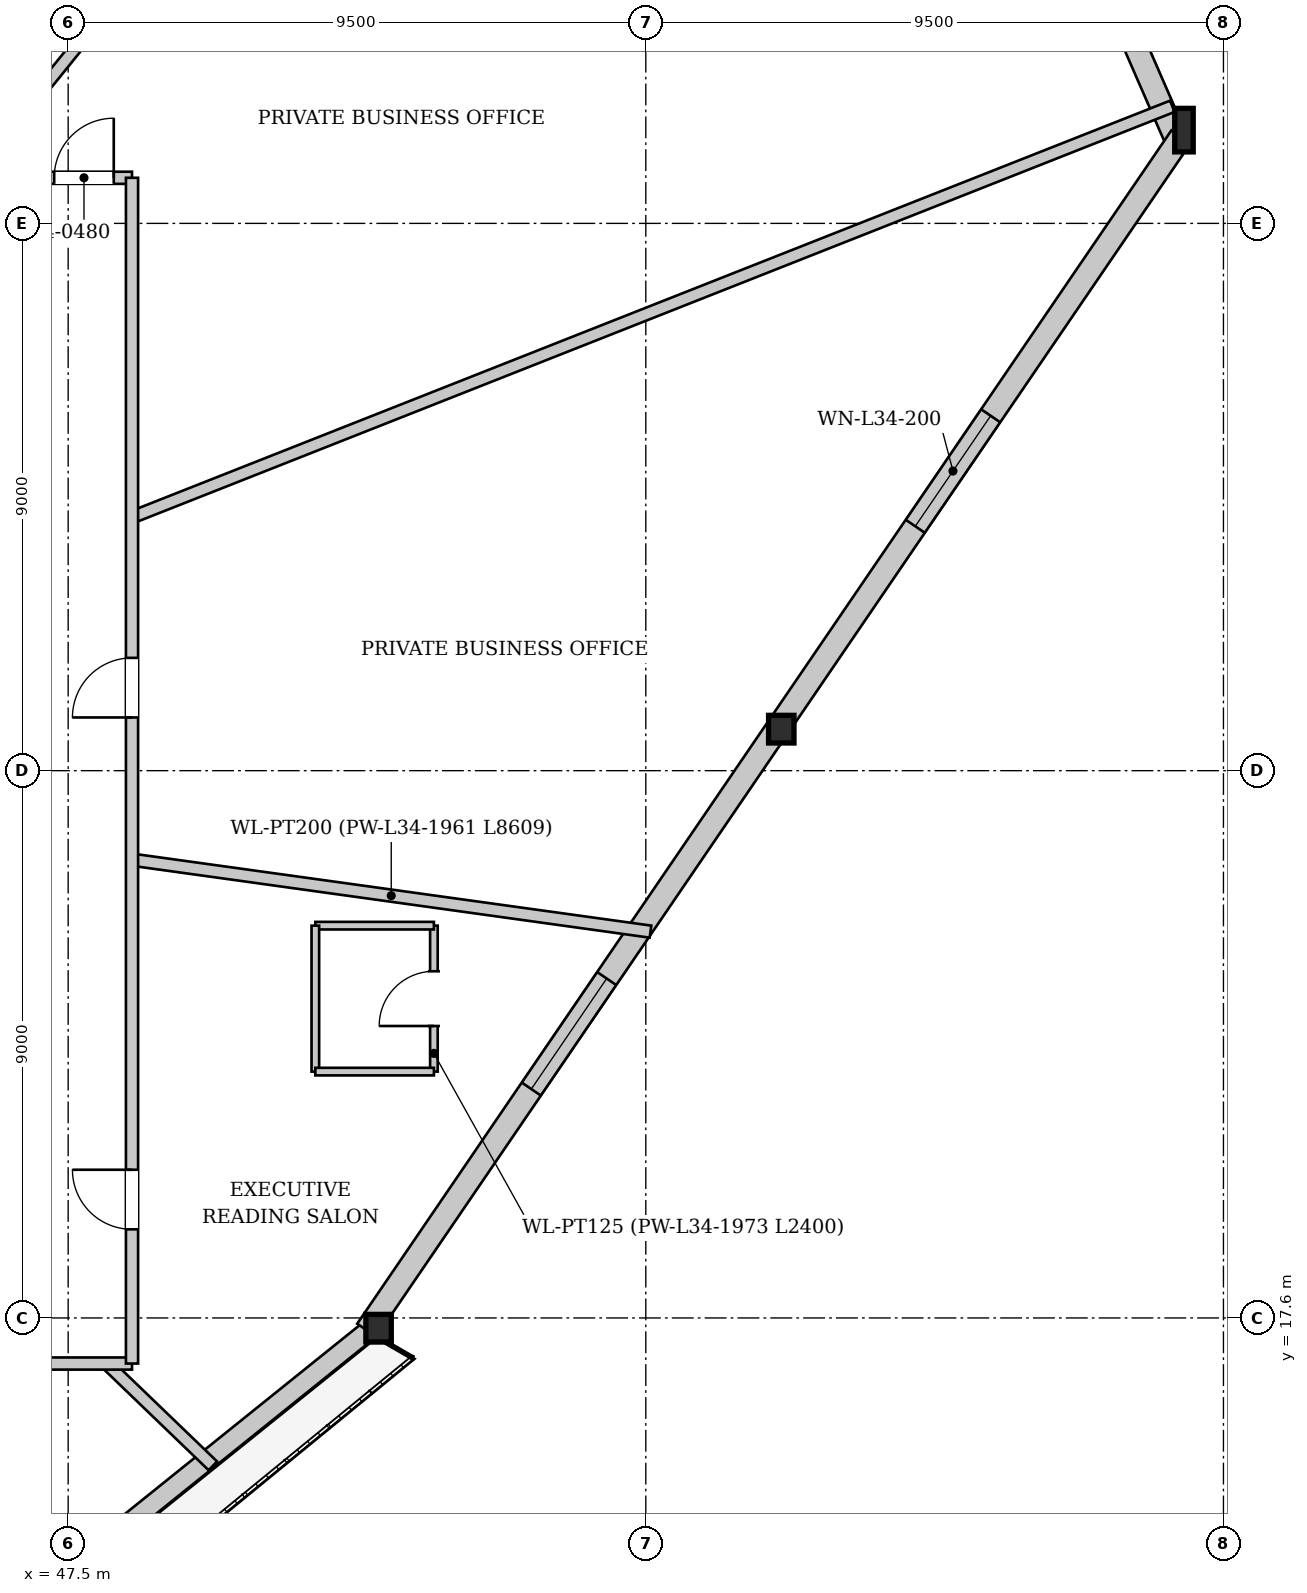
"""IFC4 building model, lengths in metres.
Left out: names, types, materials, properties, quantities, classifications, styles, units other than length and angle.
Written with IfcOpenShell. Run it as: python <this file> out.ifc"""

import sys

from ifc_helpers import new_model, si_unit, direction, frame, frame_2d, origin, origin_2d, place, context, subcontext, project, spatial, rectangle, i_section, extrude, source, transform, mapped, element, fill, save


model = new_model("IFC4")
c1 = context("Model", 3, precision=1e-05, world=origin(), true_north=direction((0.0, 1.0)))
c2 = subcontext(c1, "Body", "Model", "MODEL_VIEW")
j1 = project(units=[si_unit("LENGTHUNIT", "METRE"), si_unit("PLANEANGLEUNIT", "RADIAN")], contexts=[c1])
p1 = place(None, origin())
s1 = spatial("IfcSite", under=j1, at=p1, CompositionType="ELEMENT")
p2 = place(p1, origin())
s2 = spatial("IfcBuilding", under=s1, at=p2, CompositionType="ELEMENT")
p3 = place(p2, frame((0.0, 0.0, 130.55)))
s3 = spatial("IfcBuildingStorey", under=s2, at=p3, CompositionType="ELEMENT", Elevation=130.55)
m1 = source(origin(), c2, "Body", "SweptSolid", [
    extrude(i_section(OverallWidth=0.304, OverallDepth=0.716, WebThickness=0.021, FlangeThickness=0.04, at=origin_2d()), origin(), (0.0, 0.0, 1.0), 3.42),
])
p4 = place(p3, frame((65.958, 36.916, 0.0), z_axis=(-0.062468010228, 0.127648916899, 0.989850242063), x_axis=(-0.898212502069, -0.43956148731, 0.0)))
e1 = element("IfcColumn", 1, at=p4, inside=s3, PredefinedType="COLUMN", context=c2, shape_type="MappedRepresentation", body=[
    mapped(m1, transform((0.0, 0.0, 0.0), x_axis=(1.0, 0.0, 0.0), y_axis=(0.0, 1.0, 0.0), z_axis=(0.0, 0.0, 1.0), scale=1.0)),
])
m2 = source(origin(), c2, "Body", "SweptSolid", [
    extrude(i_section(OverallWidth=0.418, OverallDepth=0.455, WebThickness=0.038, FlangeThickness=0.059, at=origin_2d()), origin(), (0.0, 0.0, 1.0), 3.397),
])
p5 = place(p3, frame((52.567, 17.291, 0.0), z_axis=(0.0222761497, 0.082781046627, 0.996318759973), x_axis=(-0.965648124295, 0.259853227892, 0.0)))
e2 = element("IfcColumn", 2, at=p5, inside=s3, PredefinedType="COLUMN", context=c2, shape_type="MappedRepresentation", body=[
    mapped(m2, transform((0.0, 0.0, 0.0), x_axis=(1.0, 0.0, 0.0), y_axis=(0.0, 1.0, 0.0), z_axis=(0.0, 0.0, 1.0), scale=1.0)),
])
m3 = source(origin(), c2, "Body", "SweptSolid", [
    extrude(i_section(OverallWidth=0.418, OverallDepth=0.455, WebThickness=0.038, FlangeThickness=0.059, at=origin_2d()), origin(), (0.0, 0.0, 1.0), 3.405),
])
p6 = place(p3, frame((59.263, 27.103, 0.0), z_axis=(-0.020293167508, 0.105409739351, 0.994221793265), x_axis=(-0.981968309679, -0.189045599754, 0.0)))
e3 = element("IfcColumn", 3, at=p6, inside=s3, PredefinedType="COLUMN", context=c2, shape_type="MappedRepresentation", body=[
    mapped(m3, transform((0.0, 0.0, 0.0), x_axis=(1.0, 0.0, 0.0), y_axis=(0.0, 1.0, 0.0), z_axis=(0.0, 0.0, 1.0), scale=1.0)),
])
p7 = place(p3, frame((52.467, 17.415, 0.0), z_axis=(0.0, 0.0, 1.0), x_axis=(-0.779274216226, -0.626683090506, 0.0)))
e4 = element("IfcWall", 4, at=p7, inside=s3, PredefinedType="SOLIDWALL", context=c2, shape_type="SweptSolid", body=[
    extrude(rectangle(XDim=23.758, YDim=0.32, at=frame_2d((11.879, 0.0))), origin(), (0.0, 0.0, 1.0), 2.692),
])
p8 = place(p7, frame((7.053, 0.0, 0.0)))
e5 = element("IfcOpeningElement", 5, at=p8, cuts=e4, PredefinedType="OPENING", context=c2, shape_type="SweptSolid", body=[
    extrude(rectangle(XDim=1.1, YDim=2.3, at=frame_2d((0.55, 1.15))), frame((0.0, 0.17, 0.0), z_axis=(0.0, -1.0, 0.0), x_axis=(1.0, 0.0, 0.0)), (0.0, 0.0, 1.0), 0.34),
])
p9 = place(p7, frame((16.681, 0.0, 0.372)))
e6 = element("IfcOpeningElement", 6, at=p9, cuts=e4, PredefinedType="OPENING", context=c2, shape_type="SweptSolid", body=[
    extrude(rectangle(XDim=1.8, YDim=2.2, at=frame_2d((0.9, 1.1))), frame((0.0, 0.17, 0.0), z_axis=(0.0, -1.0, 0.0), x_axis=(1.0, 0.0, 0.0)), (0.0, 0.0, 1.0), 0.34),
])
p10 = place(p3, frame((64.285, 40.278, 0.0), z_axis=(0.0, 0.0, 1.0), x_axis=(0.399568588601, -0.916703301512, 0.0)))
e7 = element("IfcWall", 7, at=p10, inside=s3, PredefinedType="SOLIDWALL", context=c2, shape_type="SweptSolid", body=[
    extrude(rectangle(XDim=3.75, YDim=0.38, at=frame_2d((1.875, 0.0))), origin(), (0.0, 0.0, 1.0), 2.692),
])
p11 = place(p3, frame((65.801, 37.023, 0.0), z_axis=(0.0, 0.0, 1.0), x_axis=(-0.563622492104, -0.826032497179, 0.0)))
e8 = element("IfcWall", 8, at=p11, inside=s3, PredefinedType="SOLIDWALL", context=c2, shape_type="SweptSolid", body=[
    extrude(rectangle(XDim=23.758, YDim=0.38, at=frame_2d((11.879, 0.0))), origin(), (0.0, 0.0, 1.0), 2.692),
])
p12 = place(p11, frame((5.552, 0.0, 0.322)))
e9 = element("IfcOpeningElement", 9, at=p12, cuts=e8, PredefinedType="OPENING", context=c2, shape_type="SweptSolid", body=[
    extrude(rectangle(XDim=2.2, YDim=2.25, at=frame_2d((1.1, 1.125))), frame((0.0, 0.2, 0.0), z_axis=(0.0, -1.0, 0.0), x_axis=(1.0, 0.0, 0.0)), (0.0, 0.0, 1.0), 0.4),
])
p13 = place(p11, frame((16.756, 0.0, 0.322)))
e10 = element("IfcOpeningElement", 10, at=p13, cuts=e8, PredefinedType="OPENING", context=c2, shape_type="SweptSolid", body=[
    extrude(rectangle(XDim=2.2, YDim=2.25, at=frame_2d((1.1, 1.125))), frame((0.0, 0.2, 0.0), z_axis=(0.0, -1.0, 0.0), x_axis=(1.0, 0.0, 0.0)), (0.0, 0.0, 1.0), 0.4),
])
p14 = place(p3, frame((48.55, 25.136, 0.0), z_axis=(0.0, 0.0, 1.0), x_axis=(0.990510941898, -0.137433889493, 0.0)))
e11 = element("IfcWall", 11, at=p14, inside=s3, PredefinedType="PARTITIONING", context=c2, shape_type="SweptSolid", body=[
    extrude(rectangle(XDim=8.609, YDim=0.2, at=frame_2d((4.304, 0.0))), origin(), (0.0, 0.0, 1.0), 3.3),
])
p15 = place(p3, frame((48.55, 30.767, 0.0), z_axis=(0.0, 0.0, 1.0), x_axis=(0.930068002608, 0.367387412038, 0.0)))
e12 = element("IfcWall", 12, at=p15, inside=s3, PredefinedType="PARTITIONING", context=c2, shape_type="SweptSolid", body=[
    extrude(rectangle(XDim=18.396, YDim=0.2, at=frame_2d((9.198, 0.0))), origin(), (0.0, 0.0, 1.0), 2.795),
])
p16 = place(p3, frame((45.893, 36.35, 0.0), z_axis=(0.0, 0.0, 1.0), x_axis=(0.62920899099, 0.777236158229, 0.0)))
e13 = element("IfcWall", 13, at=p16, inside=s3, PredefinedType="PARTITIONING", context=c2, shape_type="SweptSolid", body=[
    extrude(rectangle(XDim=7.831, YDim=0.2, at=frame_2d((3.916, 0.0))), origin(), (0.0, 0.0, 1.0), 3.3),
])
p17 = place(p3, frame((48.132, 16.85, 0.0), z_axis=(0.0, 0.0, 1.0), x_axis=(0.720560376071, -0.69339220102, 0.0)))
e14 = element("IfcWall", 14, at=p17, inside=s3, PredefinedType="PARTITIONING", context=c2, shape_type="SweptSolid", body=[
    extrude(rectangle(XDim=2.426, YDim=0.2, at=frame_2d((1.213, 0.0))), origin(), (0.0, 0.0, 1.0), 3.3),
])
p18 = place(p3, frame((53.515, 21.651, 0.0), z_axis=(0.0, 0.0, 1.0), x_axis=(0.0, 1.0, 0.0)))
e15 = element("IfcWall", 15, at=p18, inside=s3, PredefinedType="PARTITIONING", context=c2, shape_type="SweptSolid", body=[
    extrude(rectangle(XDim=2.4, YDim=0.125, at=frame_2d((1.2, 0.0))), origin(), (0.0, 0.0, 1.0), 3.3),
])
p19 = place(p18, frame((0.75, 0.0, 0.0)))
e16 = element("IfcOpeningElement", 16, at=p19, cuts=e15, PredefinedType="OPENING", context=c2, shape_type="SweptSolid", body=[
    extrude(rectangle(XDim=0.9, YDim=2.1, at=frame_2d((0.45, 1.05))), frame((0.0, 0.073, 0.0), z_axis=(0.0, -1.0, 0.0), x_axis=(1.0, 0.0, 0.0)), (0.0, 0.0, 1.0), 0.145),
])
p20 = place(p3, frame((53.515, 24.051, 0.0), z_axis=(0.0, 0.0, 1.0), x_axis=(-1.0, 0.0, 0.0)))
e17 = element("IfcWall", 17, at=p20, inside=s3, PredefinedType="PARTITIONING", context=c2, shape_type="SweptSolid", body=[
    extrude(rectangle(XDim=1.95, YDim=0.125, at=frame_2d((0.975, 0.0))), origin(), (0.0, 0.0, 1.0), 3.3),
])
p21 = place(p3, frame((51.565, 24.051, 0.0), z_axis=(0.0, 0.0, 1.0), x_axis=(0.0, -1.0, 0.0)))
e18 = element("IfcWall", 18, at=p21, inside=s3, PredefinedType="PARTITIONING", context=c2, shape_type="SweptSolid", body=[
    extrude(rectangle(XDim=2.4, YDim=0.125, at=frame_2d((1.2, 0.0))), origin(), (0.0, 0.0, 1.0), 3.3),
])
p22 = place(p3, frame((51.565, 21.651, 0.0), z_axis=(0.0, 0.0, 1.0), x_axis=(1.0, 0.0, 0.0)))
e19 = element("IfcWall", 19, at=p22, inside=s3, PredefinedType="PARTITIONING", context=c2, shape_type="SweptSolid", body=[
    extrude(rectangle(XDim=1.95, YDim=0.125, at=frame_2d((0.975, 0.0))), origin(), (0.0, 0.0, 1.0), 3.3),
])
p23 = place(p3, frame((27.45, 16.85, 0.0), z_axis=(0.0, 0.0, 1.0), x_axis=(1.0, 0.0, 0.0)))
e20 = element("IfcWall", 20, at=p23, inside=s3, PredefinedType="PARTITIONING", context=c2, shape_type="SweptSolid", body=[
    extrude(rectangle(XDim=21.1, YDim=0.2, at=frame_2d((10.55, 0.0))), origin(), (0.0, 0.0, 1.0), 3.3),
])
p24 = place(p23, frame((2.724, 0.0, 0.0)))
e21 = element("IfcOpeningElement", 21, at=p24, cuts=e20, PredefinedType="OPENING", context=c2, shape_type="SweptSolid", body=[
    extrude(rectangle(XDim=0.98, YDim=2.15, at=frame_2d((0.49, 1.075))), frame((0.0, 0.11, 0.0), z_axis=(0.0, -1.0, 0.0), x_axis=(1.0, 0.0, 0.0)), (0.0, 0.0, 1.0), 0.22),
])
p25 = place(p23, frame((9.581, 0.0, 0.0)))
e22 = element("IfcOpeningElement", 22, at=p25, cuts=e20, PredefinedType="OPENING", context=c2, shape_type="SweptSolid", body=[
    extrude(rectangle(XDim=0.98, YDim=2.15, at=frame_2d((0.49, 1.075))), frame((0.0, 0.11, 0.0), z_axis=(0.0, -1.0, 0.0), x_axis=(1.0, 0.0, 0.0)), (0.0, 0.0, 1.0), 0.22),
])
p26 = place(p23, frame((16.293, 0.0, 0.0)))
e23 = element("IfcOpeningElement", 23, at=p26, cuts=e20, PredefinedType="OPENING", context=c2, shape_type="SweptSolid", body=[
    extrude(rectangle(XDim=0.98, YDim=2.15, at=frame_2d((0.49, 1.075))), frame((0.0, 0.11, 0.0), z_axis=(0.0, -1.0, 0.0), x_axis=(1.0, 0.0, 0.0)), (0.0, 0.0, 1.0), 0.22),
])
p27 = place(p3, frame((27.45, 36.35, 0.0), z_axis=(0.0, 0.0, 1.0), x_axis=(1.0, 0.0, 0.0)))
e24 = element("IfcWall", 24, at=p27, inside=s3, PredefinedType="PARTITIONING", context=c2, shape_type="SweptSolid", body=[
    extrude(rectangle(XDim=21.1, YDim=0.2, at=frame_2d((10.55, 0.0))), origin(), (0.0, 0.0, 1.0), 3.3),
])
p28 = place(p27, frame((19.82, 0.0, 0.0)))
e25 = element("IfcOpeningElement", 25, at=p28, cuts=e24, PredefinedType="OPENING", context=c2, shape_type="SweptSolid", body=[
    extrude(rectangle(XDim=0.98, YDim=2.15, at=frame_2d((0.49, 1.075))), frame((0.0, 0.11, 0.0), z_axis=(0.0, -1.0, 0.0), x_axis=(1.0, 0.0, 0.0)), (0.0, 0.0, 1.0), 0.22),
])
p29 = place(p27, frame((16.269, 0.0, 0.0)))
e26 = element("IfcOpeningElement", 26, at=p29, cuts=e24, PredefinedType="OPENING", context=c2, shape_type="SweptSolid", body=[
    extrude(rectangle(XDim=0.98, YDim=2.15, at=frame_2d((0.49, 1.075))), frame((0.0, 0.11, 0.0), z_axis=(0.0, -1.0, 0.0), x_axis=(1.0, 0.0, 0.0)), (0.0, 0.0, 1.0), 0.22),
])
p30 = place(p27, frame((8.824, 0.0, 0.0)))
e27 = element("IfcOpeningElement", 27, at=p30, cuts=e24, PredefinedType="OPENING", context=c2, shape_type="SweptSolid", body=[
    extrude(rectangle(XDim=0.98, YDim=2.15, at=frame_2d((0.49, 1.075))), frame((0.0, 0.11, 0.0), z_axis=(0.0, -1.0, 0.0), x_axis=(1.0, 0.0, 0.0)), (0.0, 0.0, 1.0), 0.22),
])
p31 = place(p27, frame((0.956, 0.0, 0.0)))
e28 = element("IfcOpeningElement", 28, at=p31, cuts=e24, PredefinedType="OPENING", context=c2, shape_type="SweptSolid", body=[
    extrude(rectangle(XDim=0.98, YDim=2.15, at=frame_2d((0.49, 1.075))), frame((0.0, 0.11, 0.0), z_axis=(0.0, -1.0, 0.0), x_axis=(1.0, 0.0, 0.0)), (0.0, 0.0, 1.0), 0.22),
])
p32 = place(p3, frame((48.55, 16.85, 0.0), z_axis=(0.0, 0.0, 1.0), x_axis=(0.0, 1.0, 0.0)))
e29 = element("IfcWall", 29, at=p32, inside=s3, PredefinedType="PARTITIONING", context=c2, shape_type="SweptSolid", body=[
    extrude(rectangle(XDim=19.5, YDim=0.2, at=frame_2d((9.75, 0.0))), origin(), (0.0, 0.0, 1.0), 3.3),
])
p33 = place(p32, frame((10.625, 0.0, 0.0)))
e30 = element("IfcOpeningElement", 30, at=p33, cuts=e29, PredefinedType="OPENING", context=c2, shape_type="SweptSolid", body=[
    extrude(rectangle(XDim=0.98, YDim=2.15, at=frame_2d((0.49, 1.075))), frame((0.0, 0.11, 0.0), z_axis=(0.0, -1.0, 0.0), x_axis=(1.0, 0.0, 0.0)), (0.0, 0.0, 1.0), 0.22),
])
p34 = place(p32, frame((2.207, 0.0, 0.0)))
e31 = element("IfcOpeningElement", 31, at=p34, cuts=e29, PredefinedType="OPENING", context=c2, shape_type="SweptSolid", body=[
    extrude(rectangle(XDim=0.98, YDim=2.15, at=frame_2d((0.49, 1.075))), frame((0.0, 0.11, 0.0), z_axis=(0.0, -1.0, 0.0), x_axis=(1.0, 0.0, 0.0)), (0.0, 0.0, 1.0), 0.22),
])
m4 = source(origin(), c2, "Body", "SweptSolid", [
    extrude(rectangle(XDim=2.2, YDim=2.25, at=frame_2d((1.1, 1.125))), frame((0.0, 0.03, 0.0), z_axis=(0.0, -1.0, 0.0), x_axis=(1.0, 0.0, 0.0)), (0.0, 0.0, 1.0), 0.06),
])
p35 = place(p12, origin())
e32 = element("IfcWindow", 32, at=p35, inside=s3, PartitioningType="SINGLE_PANEL", PredefinedType="WINDOW", context=c2, shape_type="MappedRepresentation", body=[
    mapped(m4, transform((0.0, 0.0, 0.0), x_axis=(1.0, 0.0, 0.0), y_axis=(0.0, 1.0, 0.0), z_axis=(0.0, 0.0, 1.0), scale=1.0)),
])
fill(e9, e32)
p36 = place(p13, origin())
e33 = element("IfcWindow", 33, at=p36, inside=s3, PartitioningType="SINGLE_PANEL", PredefinedType="WINDOW", context=c2, shape_type="MappedRepresentation", body=[
    mapped(m4, transform((0.0, 0.0, 0.0), x_axis=(1.0, 0.0, 0.0), y_axis=(0.0, 1.0, 0.0), z_axis=(0.0, 0.0, 1.0), scale=1.0)),
])
fill(e10, e33)
m5 = source(origin(), c2, "Body", "SweptSolid", [
    extrude(rectangle(XDim=0.9, YDim=2.1, at=frame_2d((0.45, 1.05))), frame((0.0, 0.025, 0.0), z_axis=(0.0, -1.0, 0.0), x_axis=(1.0, 0.0, 0.0)), (0.0, 0.0, 1.0), 0.05),
])
p37 = place(p19, origin())
e34 = element("IfcDoor", 34, at=p37, inside=s3, OperationType="SINGLE_SWING_LEFT", PredefinedType="DOOR", context=c2, shape_type="MappedRepresentation", body=[
    mapped(m5, transform((0.0, 0.0, 0.0), x_axis=(1.0, 0.0, 0.0), y_axis=(0.0, 1.0, 0.0), z_axis=(0.0, 0.0, 1.0), scale=1.0)),
])
fill(e16, e34)
m6 = source(origin(), c2, "Body", "SweptSolid", [
    extrude(rectangle(XDim=0.98, YDim=2.15, at=frame_2d((0.49, 1.075))), frame((0.0, 0.025, 0.0), z_axis=(0.0, -1.0, 0.0), x_axis=(1.0, 0.0, 0.0)), (0.0, 0.0, 1.0), 0.05),
])
p38 = place(p28, origin())
e35 = element("IfcDoor", 35, at=p38, inside=s3, OperationType="SINGLE_SWING_RIGHT", PredefinedType="DOOR", context=c2, shape_type="MappedRepresentation", body=[
    mapped(m6, transform((0.0, 0.0, 0.0), x_axis=(1.0, 0.0, 0.0), y_axis=(0.0, 1.0, 0.0), z_axis=(0.0, 0.0, 1.0), scale=1.0)),
])
fill(e25, e35)
p39 = place(p33, origin())
e36 = element("IfcDoor", 36, at=p39, inside=s3, OperationType="SINGLE_SWING_LEFT", PredefinedType="DOOR", context=c2, shape_type="MappedRepresentation", body=[
    mapped(m6, transform((0.0, 0.0, 0.0), x_axis=(1.0, 0.0, 0.0), y_axis=(0.0, 1.0, 0.0), z_axis=(0.0, 0.0, 1.0), scale=1.0)),
])
fill(e30, e36)
p40 = place(p34, origin())
e37 = element("IfcDoor", 37, at=p40, inside=s3, OperationType="SINGLE_SWING_RIGHT", PredefinedType="DOOR", context=c2, shape_type="MappedRepresentation", body=[
    mapped(m6, transform((0.0, 0.0, 0.0), x_axis=(1.0, 0.0, 0.0), y_axis=(0.0, 1.0, 0.0), z_axis=(0.0, 0.0, 1.0), scale=1.0)),
])
fill(e31, e37)
save(model, sys.argv[1])
